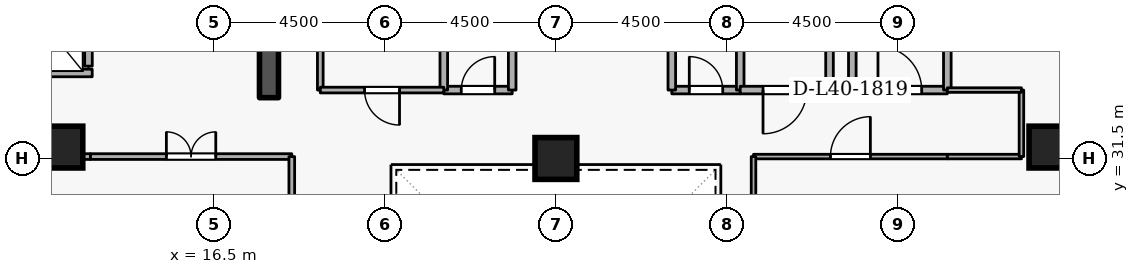
"""IFC4 building model, lengths in metres.
Left out: names, types, materials, properties, quantities, classifications, styles, units other than length and angle.
Written with IfcOpenShell. Run it as: python <this file> out.ifc"""

import sys

from ifc_helpers import new_model, si_unit, direction, frame, frame_2d, origin, origin_2d, place, context, subcontext, project, spatial, rectangle, extrude, element, fill, save


model = new_model("IFC4")
c1 = context("Model", 3, precision=1e-05, world=origin(), true_north=direction((0.0, 1.0)))
c2 = subcontext(c1, "Body", "Model", "MODEL_VIEW")
j1 = project(units=[si_unit("LENGTHUNIT", "METRE"), si_unit("PLANEANGLEUNIT", "RADIAN")], contexts=[c1])
p1 = place(None, origin())
s1 = spatial("IfcSite", under=j1, at=p1, CompositionType="ELEMENT")
p2 = place(p1, origin())
s2 = spatial("IfcBuilding", under=s1, at=p2, CompositionType="ELEMENT")
p3 = place(p2, frame((0.0, 0.0, 152.7)))
s3 = spatial("IfcBuildingStorey", under=s2, at=p3, CompositionType="ELEMENT", Elevation=152.7)
p4 = place(p3, frame((17.95, 33.1, 0.0), z_axis=(0.0, 0.0, 1.0), x_axis=(0.0, 1.0, 0.0)))
e1 = element("IfcWall", 1, at=p4, inside=s3, PredefinedType="SHEAR", context=c2, shape_type="SweptSolid", body=[
    extrude(rectangle(XDim=5.8, YDim=0.5, at=frame_2d((2.9, 0.0))), origin(), (0.0, 0.0, 1.0), 3.6),
])
for number, where, z_axis, x_axis in (
    (2, (12.5, 31.8, 0.0), (0.0, 0.0, 1.0), (1.0, 0.0, 0.0)),
    (3, (38.5, 31.8, 0.0), (0.0, 0.0, 1.0), (1.0, 0.0, 0.0)),
    (4, (25.5, 31.5, 0.0), (0.0, 0.0, 1.0), (1.0, 0.0, 0.0)),
):
    element("IfcColumn", number, at=place(p3, frame(where, z_axis=z_axis, x_axis=x_axis)), inside=s3, PredefinedType="COLUMN", context=c2, shape_type="SweptSolid", body=[
        extrude(rectangle(XDim=1.1, YDim=1.1, at=origin_2d()), origin(), (0.0, 0.0, 1.0), 3.6),
    ])
p5 = place(p3, frame((13.2, 33.93, 0.0), z_axis=(0.0, 0.0, 1.0), x_axis=(0.0, 1.0, 0.0)))
e5 = element("IfcWall", 5, at=p5, inside=s3, PredefinedType="STANDARD", context=c2, shape_type="SweptSolid", body=[
    extrude(rectangle(XDim=1.94, YDim=0.2, at=frame_2d((0.97, 0.0))), origin(), (0.0, 0.0, 1.0), 3.34),
])
p6 = place(p5, frame((0.46, 0.0, 0.0)))
e6 = element("IfcOpeningElement", 6, at=p6, cuts=e5, PredefinedType="OPENING", context=c2, shape_type="SweptSolid", body=[
    extrude(rectangle(XDim=1.02, YDim=2.06, at=frame_2d((0.51, 1.03))), frame((0.0, 0.11, 0.0), z_axis=(0.0, -1.0, 0.0), x_axis=(1.0, 0.0, 0.0)), (0.0, 0.0, 1.0), 0.22),
])
p7 = place(p3, frame((11.002, 33.75, 0.0), z_axis=(0.0, 0.0, 1.0), x_axis=(1.0, 0.0, 0.0)))
e7 = element("IfcWall", 7, at=p7, inside=s3, PredefinedType="STANDARD", context=c2, shape_type="SweptSolid", body=[
    extrude(rectangle(XDim=2.296, YDim=0.2, at=frame_2d((1.148, 0.0))), origin(), (0.0, 0.0, 1.0), 3.34),
])
p8 = place(p3, frame((33.3, 33.3, 0.0), z_axis=(0.0, 0.0, 1.0), x_axis=(1.0, 0.0, 0.0)))
e8 = element("IfcWall", 8, at=p8, inside=s3, PredefinedType="STANDARD", context=c2, shape_type="SweptSolid", body=[
    extrude(rectangle(XDim=2.5, YDim=0.2, at=frame_2d((1.25, 0.0))), origin(), (0.0, 0.0, 1.0), 3.34),
])
p9 = place(p8, frame((0.675, 0.0, 0.0)))
e9 = element("IfcOpeningElement", 9, at=p9, cuts=e8, PredefinedType="OPENING", context=c2, shape_type="SweptSolid", body=[
    extrude(rectangle(XDim=1.15, YDim=2.1, at=frame_2d((0.575, 1.05))), frame((0.0, 0.11, 0.0), z_axis=(0.0, -1.0, 0.0), x_axis=(1.0, 0.0, 0.0)), (0.0, 0.0, 1.0), 0.22),
])
p10 = place(p3, frame((35.8, 33.3, 0.0), z_axis=(0.0, 0.0, 1.0), x_axis=(0.0, 1.0, 0.0)))
e10 = element("IfcWall", 10, at=p10, inside=s3, PredefinedType="STANDARD", context=c2, shape_type="SweptSolid", body=[
    extrude(rectangle(XDim=5.7, YDim=0.2, at=frame_2d((2.85, 0.0))), origin(), (0.0, 0.0, 1.0), 3.34),
])
p11 = place(p3, frame((33.3, 35.6, 0.0), z_axis=(0.0, 0.0, 1.0), x_axis=(0.0, -1.0, 0.0)))
e11 = element("IfcWall", 11, at=p11, inside=s3, PredefinedType="STANDARD", context=c2, shape_type="SweptSolid", body=[
    extrude(rectangle(XDim=2.3, YDim=0.2, at=frame_2d((1.15, 0.0))), origin(), (0.0, 0.0, 1.0), 2.545),
])
p12 = place(p3, frame((22.55, 33.3, 0.0), z_axis=(0.0, 0.0, 1.0), x_axis=(1.0, 0.0, 0.0)))
e12 = element("IfcWall", 12, at=p12, inside=s3, PredefinedType="STANDARD", context=c2, shape_type="SweptSolid", body=[
    extrude(rectangle(XDim=1.8, YDim=0.2, at=frame_2d((0.9, 0.0))), origin(), (0.0, 0.0, 1.0), 3.34),
])
p13 = place(p12, frame((0.46, 0.0, 0.0)))
e13 = element("IfcOpeningElement", 13, at=p13, cuts=e12, PredefinedType="OPENING", context=c2, shape_type="SweptSolid", body=[
    extrude(rectangle(XDim=0.88, YDim=2.04, at=frame_2d((0.44, 1.02))), frame((0.0, 0.11, 0.0), z_axis=(0.0, -1.0, 0.0), x_axis=(1.0, 0.0, 0.0)), (0.0, 0.0, 1.0), 0.22),
])
for number, where, z_axis, x_axis in (
    (14, (24.35, 33.3, 0.0), (0.0, 0.0, 1.0), (0.0, 1.0, 0.0)),
    (15, (22.55, 35.35, 0.0), (0.0, 0.0, 1.0), (0.0, -1.0, 0.0)),
):
    element("IfcWall", number, at=place(p3, frame(where, z_axis=z_axis, x_axis=x_axis)), inside=s3, PredefinedType="STANDARD", context=c2, shape_type="SweptSolid", body=[
        extrude(rectangle(XDim=2.05, YDim=0.2, at=frame_2d((1.025, 0.0))), origin(), (0.0, 0.0, 1.0), 3.34),
    ])
p14 = place(p3, frame((28.55, 33.3, 0.0), z_axis=(0.0, 0.0, 1.0), x_axis=(1.0, 0.0, 0.0)))
e16 = element("IfcWall", 16, at=p14, inside=s3, PredefinedType="STANDARD", context=c2, shape_type="SweptSolid", body=[
    extrude(rectangle(XDim=1.8, YDim=0.2, at=frame_2d((0.9, 0.0))), origin(), (0.0, 0.0, 1.0), 3.34),
])
p15 = place(p14, frame((0.46, 0.0, 0.0)))
e17 = element("IfcOpeningElement", 17, at=p15, cuts=e16, PredefinedType="OPENING", context=c2, shape_type="SweptSolid", body=[
    extrude(rectangle(XDim=0.88, YDim=2.04, at=frame_2d((0.44, 1.02))), frame((0.0, 0.11, 0.0), z_axis=(0.0, -1.0, 0.0), x_axis=(1.0, 0.0, 0.0)), (0.0, 0.0, 1.0), 0.22),
])
for number, where, z_axis, x_axis in (
    (18, (30.35, 33.3, 0.0), (0.0, 0.0, 1.0), (0.0, 1.0, 0.0)),
    (19, (28.55, 35.35, 0.0), (0.0, 0.0, 1.0), (0.0, -1.0, 0.0)),
):
    element("IfcWall", number, at=place(p3, frame(where, z_axis=z_axis, x_axis=x_axis)), inside=s3, PredefinedType="STANDARD", context=c2, shape_type="SweptSolid", body=[
        extrude(rectangle(XDim=2.05, YDim=0.2, at=frame_2d((1.025, 0.0))), origin(), (0.0, 0.0, 1.0), 3.34),
    ])
p16 = place(p3, frame((32.7, 35.35, 0.0), z_axis=(0.0, 0.0, 1.0), x_axis=(0.0, -1.0, 0.0)))
e20 = element("IfcWall", 20, at=p16, inside=s3, PredefinedType="STANDARD", context=c2, shape_type="SweptSolid", body=[
    extrude(rectangle(XDim=2.05, YDim=0.2, at=frame_2d((1.025, 0.0))), origin(), (0.0, 0.0, 1.0), 2.545),
])
p17 = place(p3, frame((32.7, 33.3, 0.0), z_axis=(0.0, 0.0, 1.0), x_axis=(-1.0, 0.0, 0.0)))
e21 = element("IfcWall", 21, at=p17, inside=s3, PredefinedType="STANDARD", context=c2, shape_type="SweptSolid", body=[
    extrude(rectangle(XDim=2.35, YDim=0.2, at=frame_2d((1.175, 0.0))), origin(), (0.0, 0.0, 1.0), 3.34),
])
p18 = place(p17, frame((0.6, 0.0, 0.0)))
e22 = element("IfcOpeningElement", 22, at=p18, cuts=e21, PredefinedType="OPENING", context=c2, shape_type="SweptSolid", body=[
    extrude(rectangle(XDim=1.15, YDim=2.1, at=frame_2d((0.575, 1.05))), frame((0.0, 0.11, 0.0), z_axis=(0.0, -1.0, 0.0), x_axis=(1.0, 0.0, 0.0)), (0.0, 0.0, 1.0), 0.22),
])
p19 = place(p3, frame((19.3, 33.3, 0.0), z_axis=(0.0, 0.0, 1.0), x_axis=(0.0, 1.0, 0.0)))
e23 = element("IfcWall", 23, at=p19, inside=s3, PredefinedType="PARTITIONING", context=c2, shape_type="SweptSolid", body=[
    extrude(rectangle(XDim=2.05, YDim=0.15, at=frame_2d((1.025, 0.0))), origin(), (0.0, 0.0, 1.0), 3.34),
])
p20 = place(p3, frame((22.55, 33.3, 0.0), z_axis=(0.0, 0.0, 1.0), x_axis=(-1.0, 0.0, 0.0)))
e24 = element("IfcWall", 24, at=p20, inside=s3, PredefinedType="PARTITIONING", context=c2, shape_type="SweptSolid", body=[
    extrude(rectangle(XDim=3.25, YDim=0.15, at=frame_2d((1.625, 0.0))), origin(), (0.0, 0.0, 1.0), 3.34),
])
p21 = place(p20, frame((1.165, 0.0, 0.0)))
e25 = element("IfcOpeningElement", 25, at=p21, cuts=e24, PredefinedType="OPENING", context=c2, shape_type="SweptSolid", body=[
    extrude(rectangle(XDim=0.92, YDim=2.08, at=frame_2d((0.46, 1.04))), frame((0.0, 0.085, 0.0), z_axis=(0.0, -1.0, 0.0), x_axis=(1.0, 0.0, 0.0)), (0.0, 0.0, 1.0), 0.17),
])
p22 = place(p3, frame((13.25, 31.55, 0.0), z_axis=(0.0, 0.0, 1.0), x_axis=(1.0, 0.0, 0.0)))
e26 = element("IfcWall", 26, at=p22, inside=s3, PredefinedType="PARTITIONING", context=c2, shape_type="SweptSolid", body=[
    extrude(rectangle(XDim=5.3, YDim=0.15, at=frame_2d((2.65, 0.0))), origin(), (0.0, 0.0, 1.0), 3.34),
])
p23 = place(p22, frame((2.0, 0.0, 0.0)))
e27 = element("IfcOpeningElement", 27, at=p23, cuts=e26, PredefinedType="OPENING", context=c2, shape_type="SweptSolid", body=[
    extrude(rectangle(XDim=1.3, YDim=2.12, at=frame_2d((0.65, 1.06))), frame((0.0, 0.085, 0.0), z_axis=(0.0, -1.0, 0.0), x_axis=(1.0, 0.0, 0.0)), (0.0, 0.0, 1.0), 0.17),
])
p24 = place(p3, frame((18.55, 31.55, 0.0), z_axis=(0.0, 0.0, 1.0), x_axis=(0.0, -1.0, 0.0)))
e28 = element("IfcWall", 28, at=p24, inside=s3, PredefinedType="PARTITIONING", context=c2, shape_type="SweptSolid", body=[
    extrude(rectangle(XDim=4.55, YDim=0.15, at=frame_2d((2.275, 0.0))), origin(), (0.0, 0.0, 1.0), 3.34),
])
p25 = place(p3, frame((10.9, 31.55, 0.0), z_axis=(0.0, 0.0, 1.0), x_axis=(1.0, 0.0, 0.0)))
e29 = element("IfcWall", 29, at=p25, inside=s3, PredefinedType="PARTITIONING", context=c2, shape_type="SweptSolid", body=[
    extrude(rectangle(XDim=2.35, YDim=0.15, at=frame_2d((1.175, 0.0))), origin(), (0.0, 0.0, 1.0), 3.34),
])
p26 = place(p3, frame((30.7, 31.55, 0.0), z_axis=(0.0, 0.0, 1.0), x_axis=(1.0, 0.0, 0.0)))
e30 = element("IfcWall", 30, at=p26, inside=s3, PredefinedType="PARTITIONING", context=c2, shape_type="SweptSolid", body=[
    extrude(rectangle(XDim=5.1, YDim=0.12, at=frame_2d((2.55, 0.0))), origin(), (0.0, 0.0, 1.0), 3.34),
])
p27 = place(p26, frame((2.025, 0.0, 0.0)))
e31 = element("IfcOpeningElement", 31, at=p27, cuts=e30, PredefinedType="OPENING", context=c2, shape_type="SweptSolid", body=[
    extrude(rectangle(XDim=1.05, YDim=2.1, at=frame_2d((0.525, 1.05))), frame((0.0, 0.07, 0.0), z_axis=(0.0, -1.0, 0.0), x_axis=(1.0, 0.0, 0.0)), (0.0, 0.0, 1.0), 0.14),
])
p28 = place(p3, frame((35.8, 31.55, 0.0), z_axis=(0.0, 0.0, 1.0), x_axis=(1.0, 0.0, 0.0)))
e32 = element("IfcWall", 32, at=p28, inside=s3, PredefinedType="PARTITIONING", context=c2, shape_type="SweptSolid", body=[
    extrude(rectangle(XDim=1.95, YDim=0.12, at=frame_2d((0.975, 0.0))), origin(), (0.0, 0.0, 1.0), 3.34),
])
p29 = place(p3, frame((37.75, 31.55, 0.0), z_axis=(0.0, 0.0, 1.0), x_axis=(0.0, 1.0, 0.0)))
e33 = element("IfcWall", 33, at=p29, inside=s3, PredefinedType="PARTITIONING", context=c2, shape_type="SweptSolid", body=[
    extrude(rectangle(XDim=1.75, YDim=0.12, at=frame_2d((0.875, 0.0))), origin(), (0.0, 0.0, 1.0), 3.34),
])
p30 = place(p3, frame((37.75, 33.3, 0.0), z_axis=(0.0, 0.0, 1.0), x_axis=(-1.0, 0.0, 0.0)))
e34 = element("IfcWall", 34, at=p30, inside=s3, PredefinedType="PARTITIONING", context=c2, shape_type="SweptSolid", body=[
    extrude(rectangle(XDim=1.95, YDim=0.12, at=frame_2d((0.975, 0.0))), origin(), (0.0, 0.0, 1.0), 3.34),
])
p31 = place(p3, frame((30.7, 27.0, 0.0), z_axis=(0.0, 0.0, 1.0), x_axis=(0.0, 1.0, 0.0)))
e35 = element("IfcWall", 35, at=p31, inside=s3, PredefinedType="PARTITIONING", context=c2, shape_type="SweptSolid", body=[
    extrude(rectangle(XDim=4.55, YDim=0.12, at=frame_2d((2.275, 0.0))), origin(), (0.0, 0.0, 1.0), 3.34),
])
p32 = place(p9, origin())
e36 = element("IfcDoor", 36, at=p32, inside=s3, OperationType="SINGLE_SWING_LEFT", PredefinedType="DOOR", context=c2, shape_type="SweptSolid", body=[
    extrude(rectangle(XDim=1.15, YDim=2.1, at=frame_2d((0.575, 1.05))), frame((0.0, 0.025, 0.0), z_axis=(0.0, -1.0, 0.0), x_axis=(1.0, 0.0, 0.0)), (0.0, 0.0, 1.0), 0.05),
])
fill(e9, e36)
p33 = place(p13, origin())
e37 = element("IfcDoor", 37, at=p33, inside=s3, OperationType="SINGLE_SWING_RIGHT", PredefinedType="DOOR", context=c2, shape_type="SweptSolid", body=[
    extrude(rectangle(XDim=0.88, YDim=2.04, at=frame_2d((0.44, 1.02))), frame((0.0, 0.025, 0.0), z_axis=(0.0, -1.0, 0.0), x_axis=(1.0, 0.0, 0.0)), (0.0, 0.0, 1.0), 0.05),
])
fill(e13, e37)
p34 = place(p15, origin())
e38 = element("IfcDoor", 38, at=p34, inside=s3, OperationType="SINGLE_SWING_LEFT", PredefinedType="DOOR", context=c2, shape_type="SweptSolid", body=[
    extrude(rectangle(XDim=0.88, YDim=2.04, at=frame_2d((0.44, 1.02))), frame((0.0, 0.025, 0.0), z_axis=(0.0, -1.0, 0.0), x_axis=(1.0, 0.0, 0.0)), (0.0, 0.0, 1.0), 0.05),
])
fill(e17, e38)
p35 = place(p21, origin())
e39 = element("IfcDoor", 39, at=p35, inside=s3, OperationType="SINGLE_SWING_LEFT", PredefinedType="DOOR", context=c2, shape_type="SweptSolid", body=[
    extrude(rectangle(XDim=0.92, YDim=2.08, at=frame_2d((0.46, 1.04))), frame((0.0, 0.025, 0.0), z_axis=(0.0, -1.0, 0.0), x_axis=(1.0, 0.0, 0.0)), (0.0, 0.0, 1.0), 0.05),
])
fill(e25, e39)
p36 = place(p18, origin())
e40 = element("IfcDoor", 40, at=p36, inside=s3, OperationType="SINGLE_SWING_RIGHT", PredefinedType="DOOR", context=c2, shape_type="SweptSolid", body=[
    extrude(rectangle(XDim=1.15, YDim=2.1, at=frame_2d((0.575, 1.05))), frame((0.0, 0.025, 0.0), z_axis=(0.0, -1.0, 0.0), x_axis=(1.0, 0.0, 0.0)), (0.0, 0.0, 1.0), 0.05),
])
fill(e22, e40)
p37 = place(p23, origin())
e41 = element("IfcDoor", 41, at=p37, inside=s3, OperationType="DOUBLE_DOOR_SINGLE_SWING", PredefinedType="DOOR", context=c2, shape_type="SweptSolid", body=[
    extrude(rectangle(XDim=1.3, YDim=2.12, at=frame_2d((0.65, 1.06))), frame((0.0, 0.025, 0.0), z_axis=(0.0, -1.0, 0.0), x_axis=(1.0, 0.0, 0.0)), (0.0, 0.0, 1.0), 0.05),
])
fill(e27, e41)
p38 = place(p27, origin())
e42 = element("IfcDoor", 42, at=p38, inside=s3, OperationType="SINGLE_SWING_RIGHT", PredefinedType="DOOR", context=c2, shape_type="SweptSolid", body=[
    extrude(rectangle(XDim=1.05, YDim=2.1, at=frame_2d((0.525, 1.05))), frame((0.0, 0.025, 0.0), z_axis=(0.0, -1.0, 0.0), x_axis=(1.0, 0.0, 0.0)), (0.0, 0.0, 1.0), 0.05),
])
fill(e31, e42)
save(model, sys.argv[1])
